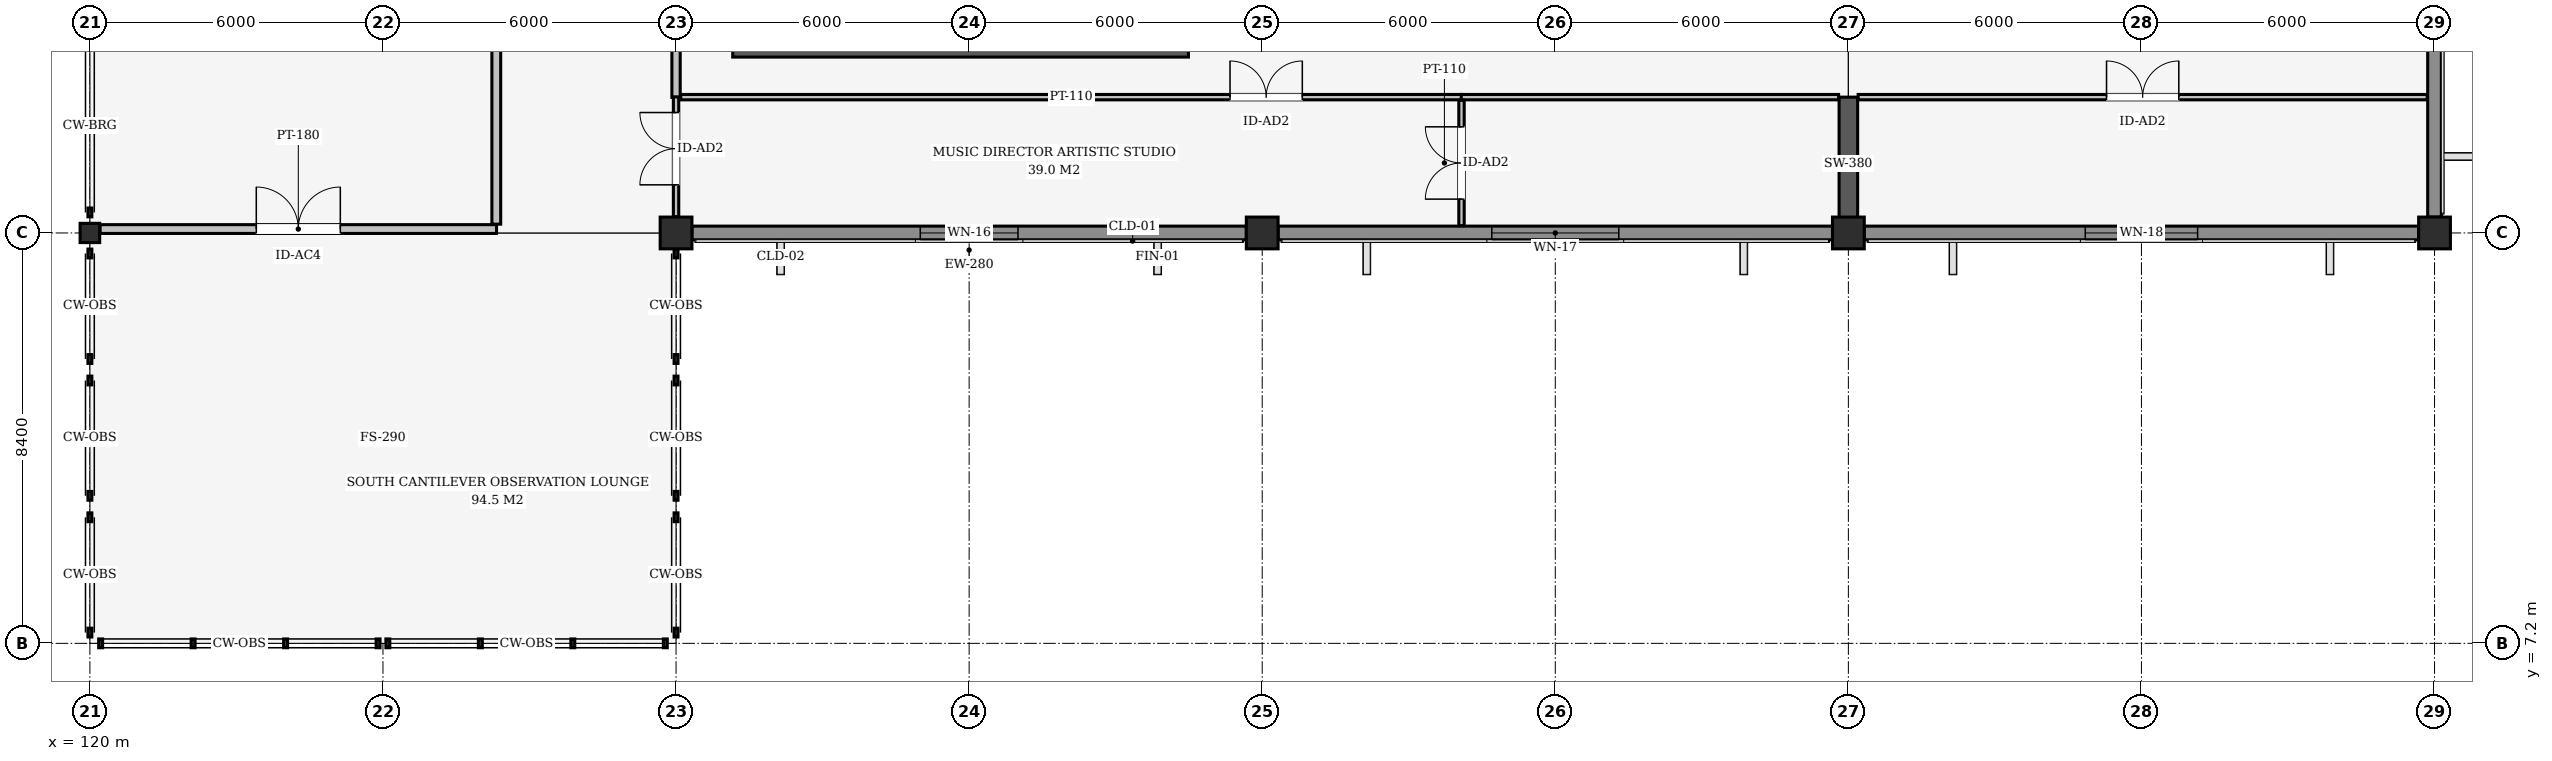
"""IFC4 building model, lengths in metres.
Left out: names, types, materials, properties, quantities, classifications, styles, units other than length and angle.
Written with IfcOpenShell. Run it as: python <this file> out.ifc"""

import sys

from ifc_helpers import new_model, si_unit, direction, frame, frame_2d, origin, origin_2d, place, context, subcontext, project, spatial, rectangle, i_section, extrude, element, fill, save


model = new_model("IFC4")
c1 = context("Model", 3, precision=1e-05, world=origin(), true_north=direction((0.0, 1.0)))
c2 = subcontext(c1, "Body", "Model", "MODEL_VIEW")
j1 = project(units=[si_unit("LENGTHUNIT", "METRE"), si_unit("PLANEANGLEUNIT", "RADIAN")], contexts=[c1])
p1 = place(None, origin())
s1 = spatial("IfcSite", under=j1, at=p1, CompositionType="ELEMENT")
p2 = place(p1, origin())
s2 = spatial("IfcBuilding", under=s1, at=p2, CompositionType="ELEMENT")
p3 = place(p2, frame((0.0, 0.0, 13.8)))
s3 = spatial("IfcBuildingStorey", under=s2, at=p3, CompositionType="ELEMENT", Elevation=13.8)
p4 = place(p3, frame((120.0, 15.6, 0.0), z_axis=(0.0, 0.0, 1.0), x_axis=(1.0, 0.0, 0.0)))
e1 = element("IfcColumn", 1, at=p4, inside=s3, PredefinedType="COLUMN", context=c2, shape_type="SweptSolid", body=[
    extrude(i_section(OverallWidth=0.401, OverallDepth=0.394, WebThickness=0.023, FlangeThickness=0.037, at=origin_2d()), origin(), (0.0, 0.0, 1.0), 4.22),
])
for number, where, z_axis, x_axis in (
    (2, (132.0, 15.6, 0.0), (0.0, 0.0, 1.0), (1.0, 0.0, 0.0)),
    (3, (144.0, 15.6, 0.0), (0.0, 0.0, 1.0), (1.0, 0.0, 0.0)),
    (4, (156.0, 15.6, 0.0), (0.0, 0.0, 1.0), (1.0, 0.0, 0.0)),
    (5, (168.0, 15.6, 0.0), (0.0, 0.0, 1.0), (1.0, 0.0, 0.0)),
):
    element("IfcColumn", number, at=place(p3, frame(where, z_axis=z_axis, x_axis=x_axis)), inside=s3, PredefinedType="COLUMN", context=c2, shape_type="SweptSolid", body=[
        extrude(rectangle(XDim=0.65, YDim=0.65, at=origin_2d()), origin(), (0.0, 0.0, 1.0), 4.5),
    ])
p5 = place(p3, frame((156.0, 15.65, 0.0), z_axis=(0.0, 0.0, 1.0), x_axis=(0.0, 1.0, 0.0)))
e6 = element("IfcWall", 6, at=p5, inside=s3, PredefinedType="SHEAR", context=c2, shape_type="SweptSolid", body=[
    extrude(rectangle(XDim=2.73, YDim=0.38, at=frame_2d((1.365, 0.0))), origin(), (0.0, 0.0, 1.0), 3.38),
])
p6 = place(p3, frame((143.675, 15.6, 0.0), z_axis=(0.0, 0.0, 1.0), x_axis=(-1.0, 0.0, 0.0)))
e7 = element("IfcWall", 7, at=p6, inside=s3, PredefinedType="SOLIDWALL", context=c2, shape_type="SweptSolid", body=[
    extrude(rectangle(XDim=11.35, YDim=0.28, at=frame_2d((5.675, 0.0))), origin(), (0.0, 0.0, 1.0), 3.599),
])
p7 = place(p6, frame((4.675, 0.0, 0.85)))
e8 = element("IfcOpeningElement", 8, at=p7, cuts=e7, PredefinedType="OPENING", context=c2, shape_type="SweptSolid", body=[
    extrude(rectangle(XDim=2.0, YDim=1.85, at=frame_2d((1.0, 0.925))), frame((0.0, 0.15, 0.0), z_axis=(0.0, -1.0, 0.0), x_axis=(1.0, 0.0, 0.0)), (0.0, 0.0, 1.0), 0.3),
])
p8 = place(p3, frame((155.675, 15.6, 0.0), z_axis=(0.0, 0.0, 1.0), x_axis=(-1.0, 0.0, 0.0)))
e9 = element("IfcWall", 9, at=p8, inside=s3, PredefinedType="SOLIDWALL", context=c2, shape_type="SweptSolid", body=[
    extrude(rectangle(XDim=11.35, YDim=0.28, at=frame_2d((5.675, 0.0))), origin(), (0.0, 0.0, 1.0), 3.599),
])
p9 = place(p8, frame((4.375, 0.0, 0.85)))
e10 = element("IfcOpeningElement", 10, at=p9, cuts=e9, PredefinedType="OPENING", context=c2, shape_type="SweptSolid", body=[
    extrude(rectangle(XDim=2.6, YDim=1.7, at=frame_2d((1.3, 0.85))), frame((0.0, 0.15, 0.0), z_axis=(0.0, -1.0, 0.0), x_axis=(1.0, 0.0, 0.0)), (0.0, 0.0, 1.0), 0.3),
])
p10 = place(p3, frame((167.675, 15.6, 0.0), z_axis=(0.0, 0.0, 1.0), x_axis=(-1.0, 0.0, 0.0)))
e11 = element("IfcWall", 11, at=p10, inside=s3, PredefinedType="SOLIDWALL", context=c2, shape_type="SweptSolid", body=[
    extrude(rectangle(XDim=11.35, YDim=0.28, at=frame_2d((5.675, 0.0))), origin(), (0.0, 0.0, 1.0), 3.599),
])
p11 = place(p10, frame((4.525, 0.0, 0.85)))
e12 = element("IfcOpeningElement", 12, at=p11, cuts=e11, PredefinedType="OPENING", context=c2, shape_type="SweptSolid", body=[
    extrude(rectangle(XDim=2.3, YDim=1.6, at=frame_2d((1.15, 0.8))), frame((0.0, 0.15, 0.0), z_axis=(0.0, -1.0, 0.0), x_axis=(1.0, 0.0, 0.0)), (0.0, 0.0, 1.0), 0.3),
])
p12 = place(p3, frame((168.0, 23.675, 0.0), z_axis=(0.0, 0.0, 1.0), x_axis=(0.0, -1.0, 0.0)))
e13 = element("IfcWall", 13, at=p12, inside=s3, PredefinedType="SOLIDWALL", context=c2, shape_type="SweptSolid", body=[
    extrude(rectangle(XDim=7.75, YDim=0.28, at=frame_2d((3.875, 0.0))), origin(), (0.0, 0.0, 1.0), 3.598),
])
p13 = place(p12, frame((0.92, 0.0, 0.85)))
e14 = element("IfcOpeningElement", 14, at=p13, cuts=e13, PredefinedType="OPENING", context=c2, shape_type="SweptSolid", body=[
    extrude(rectangle(XDim=2.5, YDim=1.9, at=frame_2d((1.25, 0.95))), frame((0.0, 0.15, 0.0), z_axis=(0.0, -1.0, 0.0), x_axis=(1.0, 0.0, 0.0)), (0.0, 0.0, 1.0), 0.3),
])
p14 = place(p3, frame((133.16, 19.345, 0.0), z_axis=(0.0, 0.0, 1.0), x_axis=(1.0, 0.0, 0.0)))
e15 = element("IfcWall", 15, at=p14, inside=s3, PredefinedType="SHEAR", context=c2, shape_type="SweptSolid", body=[
    extrude(rectangle(XDim=9.33, YDim=0.29, at=frame_2d((4.665, 0.0))), origin(), (0.0, 0.0, 1.0), 4.23),
])
p15 = place(p3, frame((120.208, 15.68, 0.0), z_axis=(0.0, 0.0, 1.0), x_axis=(1.0, 0.0, 0.0)))
e16 = element("IfcWall", 16, at=p15, inside=s3, PredefinedType="PARTITIONING", context=c2, shape_type="SweptSolid", body=[
    extrude(rectangle(XDim=8.116, YDim=0.18, at=frame_2d((4.058, 0.0))), origin(), (0.0, 0.0, 1.0), 3.438),
])
p16 = place(p15, frame((3.198, 0.0, 0.0)))
e17 = element("IfcOpeningElement", 17, at=p16, cuts=e16, PredefinedType="OPENING", context=c2, shape_type="SweptSolid", body=[
    extrude(rectangle(XDim=1.72, YDim=2.34, at=frame_2d((0.86, 1.17))), frame((0.0, 0.1, 0.0), z_axis=(0.0, -1.0, 0.0), x_axis=(1.0, 0.0, 0.0)), (0.0, 0.0, 1.0), 0.2),
])
p17 = place(p3, frame((128.32, 15.78, 0.0), z_axis=(0.0, 0.0, 1.0), x_axis=(0.0, 1.0, 0.0)))
e18 = element("IfcWall", 18, at=p17, inside=s3, PredefinedType="PARTITIONING", context=c2, shape_type="SweptSolid", body=[
    extrude(rectangle(XDim=23.17, YDim=0.18, at=frame_2d((11.585, 0.0))), origin(), (0.0, 0.0, 1.0), 4.24),
])
p18 = place(p17, frame((10.725, 0.0, 0.0)))
e19 = element("IfcOpeningElement", 19, at=p18, cuts=e18, PredefinedType="OPENING", context=c2, shape_type="SweptSolid", body=[
    extrude(rectangle(XDim=1.72, YDim=2.34, at=frame_2d((0.86, 1.17))), frame((0.0, 0.1, 0.0), z_axis=(0.0, -1.0, 0.0), x_axis=(1.0, 0.0, 0.0)), (0.0, 0.0, 1.0), 0.2),
])
p19 = place(p3, frame((132.0, 18.375, 0.0), z_axis=(0.0, 0.0, 1.0), x_axis=(0.0, 1.0, 0.0)))
e20 = element("IfcWall", 20, at=p19, inside=s3, PredefinedType="PARTITIONING", context=c2, shape_type="SweptSolid", body=[
    extrude(rectangle(XDim=1.277, YDim=0.17, at=frame_2d((0.639, 0.0))), origin(), (0.0, 0.0, 1.0), 3.801),
])
p20 = place(p3, frame((132.0, 15.933, 0.0), z_axis=(0.0, 0.0, 1.0), x_axis=(0.0, 1.0, 0.0)))
e21 = element("IfcWall", 21, at=p20, inside=s3, PredefinedType="PARTITIONING", context=c2, shape_type="SweptSolid", body=[
    extrude(rectangle(XDim=2.452, YDim=0.11, at=frame_2d((1.226, 0.0))), origin(), (0.0, 0.0, 1.0), 3.801),
])
p21 = place(p20, frame((0.652, 0.0, 0.0)))
e22 = element("IfcOpeningElement", 22, at=p21, cuts=e21, PredefinedType="OPENING", context=c2, shape_type="SweptSolid", body=[
    extrude(rectangle(XDim=1.48, YDim=2.22, at=frame_2d((0.74, 1.11))), frame((0.0, 0.065, 0.0), z_axis=(0.0, -1.0, 0.0), x_axis=(1.0, 0.0, 0.0)), (0.0, 0.0, 1.0), 0.13),
])
p22 = place(p3, frame((132.095, 18.38, 0.0), z_axis=(0.0, 0.0, 1.0), x_axis=(1.0, 0.0, 0.0)))
e23 = element("IfcWall", 23, at=p22, inside=s3, PredefinedType="PARTITIONING", context=c2, shape_type="SweptSolid", body=[
    extrude(rectangle(XDim=15.99, YDim=0.11, at=frame_2d((7.995, 0.0))), origin(), (0.0, 0.0, 1.0), 4.21),
])
p23 = place(p22, frame((11.246, 0.0, 0.0)))
e24 = element("IfcOpeningElement", 24, at=p23, cuts=e23, PredefinedType="OPENING", context=c2, shape_type="SweptSolid", body=[
    extrude(rectangle(XDim=1.48, YDim=2.22, at=frame_2d((0.74, 1.11))), frame((0.0, 0.065, 0.0), z_axis=(0.0, -1.0, 0.0), x_axis=(1.0, 0.0, 0.0)), (0.0, 0.0, 1.0), 0.13),
])
p24 = place(p3, frame((148.075, 18.38, 0.0), z_axis=(0.0, 0.0, 1.0), x_axis=(1.0, 0.0, 0.0)))
e25 = element("IfcWall", 25, at=p24, inside=s3, PredefinedType="PARTITIONING", context=c2, shape_type="SweptSolid", body=[
    extrude(rectangle(XDim=7.725, YDim=0.11, at=frame_2d((3.863, 0.0))), origin(), (0.0, 0.0, 1.0), 4.21),
])
p25 = place(p3, frame((156.2, 18.38, 0.0), z_axis=(0.0, 0.0, 1.0), x_axis=(1.0, 0.0, 0.0)))
e26 = element("IfcWall", 26, at=p25, inside=s3, PredefinedType="PARTITIONING", context=c2, shape_type="SweptSolid", body=[
    extrude(rectangle(XDim=11.65, YDim=0.11, at=frame_2d((5.825, 0.0))), origin(), (0.0, 0.0, 1.0), 4.21),
])
p26 = place(p25, frame((5.085, 0.0, 0.0)))
e27 = element("IfcOpeningElement", 27, at=p26, cuts=e26, PredefinedType="OPENING", context=c2, shape_type="SweptSolid", body=[
    extrude(rectangle(XDim=1.48, YDim=2.22, at=frame_2d((0.74, 1.11))), frame((0.0, 0.065, 0.0), z_axis=(0.0, -1.0, 0.0), x_axis=(1.0, 0.0, 0.0)), (0.0, 0.0, 1.0), 0.13),
])
p27 = place(p3, frame((148.08, 15.75, 0.0), z_axis=(0.0, 0.0, 1.0), x_axis=(0.0, 1.0, 0.0)))
e28 = element("IfcWall", 28, at=p27, inside=s3, PredefinedType="PARTITIONING", context=c2, shape_type="SweptSolid", body=[
    extrude(rectangle(XDim=2.565, YDim=0.11, at=frame_2d((1.282, 0.0))), origin(), (0.0, 0.0, 1.0), 3.753),
])
p28 = place(p27, frame((0.542, 0.0, 0.0)))
e29 = element("IfcOpeningElement", 29, at=p28, cuts=e28, PredefinedType="OPENING", context=c2, shape_type="SweptSolid", body=[
    extrude(rectangle(XDim=1.48, YDim=2.22, at=frame_2d((0.74, 1.11))), frame((0.0, 0.065, 0.0), z_axis=(0.0, -1.0, 0.0), x_axis=(1.0, 0.0, 0.0)), (0.0, 0.0, 1.0), 0.13),
])
p29 = place(p7, origin())
e30 = element("IfcWindow", 30, at=p29, inside=s3, PartitioningType="SINGLE_PANEL", PredefinedType="WINDOW", context=c2, shape_type="SweptSolid", body=[
    extrude(rectangle(XDim=2.0, YDim=1.85, at=frame_2d((1.0, 0.925))), frame((0.0, 0.03, 0.0), z_axis=(0.0, -1.0, 0.0), x_axis=(1.0, 0.0, 0.0)), (0.0, 0.0, 1.0), 0.06),
])
fill(e8, e30)
p30 = place(p9, origin())
e31 = element("IfcWindow", 31, at=p30, inside=s3, PartitioningType="SINGLE_PANEL", PredefinedType="WINDOW", context=c2, shape_type="SweptSolid", body=[
    extrude(rectangle(XDim=2.6, YDim=1.7, at=frame_2d((1.3, 0.85))), frame((0.0, 0.03, 0.0), z_axis=(0.0, -1.0, 0.0), x_axis=(1.0, 0.0, 0.0)), (0.0, 0.0, 1.0), 0.06),
])
fill(e10, e31)
p31 = place(p11, origin())
e32 = element("IfcWindow", 32, at=p31, inside=s3, PartitioningType="SINGLE_PANEL", PredefinedType="WINDOW", context=c2, shape_type="SweptSolid", body=[
    extrude(rectangle(XDim=2.3, YDim=1.6, at=frame_2d((1.15, 0.8))), frame((0.0, 0.03, 0.0), z_axis=(0.0, -1.0, 0.0), x_axis=(1.0, 0.0, 0.0)), (0.0, 0.0, 1.0), 0.06),
])
fill(e12, e32)
p32 = place(p16, origin())
e33 = element("IfcDoor", 33, at=p32, inside=s3, OperationType="DOUBLE_DOOR_SINGLE_SWING", PredefinedType="DOOR", context=c2, shape_type="SweptSolid", body=[
    extrude(rectangle(XDim=1.72, YDim=2.34, at=frame_2d((0.86, 1.17))), frame((0.0, 0.025, 0.0), z_axis=(0.0, -1.0, 0.0), x_axis=(1.0, 0.0, 0.0)), (0.0, 0.0, 1.0), 0.05),
])
fill(e17, e33)
p33 = place(p21, origin())
e34 = element("IfcDoor", 34, at=p33, inside=s3, OperationType="DOUBLE_DOOR_SINGLE_SWING", PredefinedType="DOOR", context=c2, shape_type="SweptSolid", body=[
    extrude(rectangle(XDim=1.48, YDim=2.22, at=frame_2d((0.74, 1.11))), frame((0.0, 0.025, 0.0), z_axis=(0.0, -1.0, 0.0), x_axis=(1.0, 0.0, 0.0)), (0.0, 0.0, 1.0), 0.05),
])
fill(e22, e34)
p34 = place(p23, origin())
e35 = element("IfcDoor", 35, at=p34, inside=s3, OperationType="DOUBLE_DOOR_SINGLE_SWING", PredefinedType="DOOR", context=c2, shape_type="SweptSolid", body=[
    extrude(rectangle(XDim=1.48, YDim=2.22, at=frame_2d((0.74, 1.11))), frame((0.0, 0.025, 0.0), z_axis=(0.0, -1.0, 0.0), x_axis=(1.0, 0.0, 0.0)), (0.0, 0.0, 1.0), 0.05),
])
fill(e24, e35)
p35 = place(p26, origin())
e36 = element("IfcDoor", 36, at=p35, inside=s3, OperationType="DOUBLE_DOOR_SINGLE_SWING", PredefinedType="DOOR", context=c2, shape_type="SweptSolid", body=[
    extrude(rectangle(XDim=1.48, YDim=2.22, at=frame_2d((0.74, 1.11))), frame((0.0, 0.025, 0.0), z_axis=(0.0, -1.0, 0.0), x_axis=(1.0, 0.0, 0.0)), (0.0, 0.0, 1.0), 0.05),
])
fill(e27, e36)
p36 = place(p28, origin())
e37 = element("IfcDoor", 37, at=p36, inside=s3, OperationType="DOUBLE_DOOR_SINGLE_SWING", PredefinedType="DOOR", context=c2, shape_type="SweptSolid", body=[
    extrude(rectangle(XDim=1.48, YDim=2.22, at=frame_2d((0.74, 1.11))), frame((0.0, 0.025, 0.0), z_axis=(0.0, -1.0, 0.0), x_axis=(1.0, 0.0, 0.0)), (0.0, 0.0, 1.0), 0.05),
])
fill(e29, e37)
save(model, sys.argv[1])
